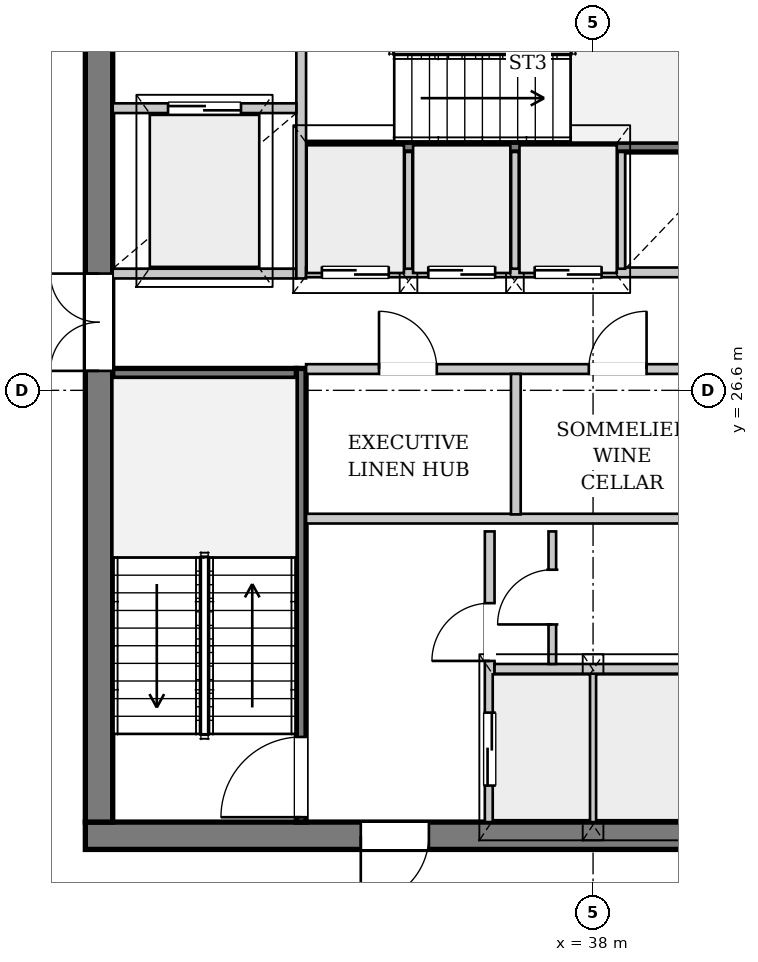
"""IFC4 building model, lengths in metres.
Left out: names, types, materials, properties, quantities, classifications, styles, units other than length and angle.
Written with IfcOpenShell. Run it as: python <this file> out.ifc"""

import sys

from ifc_helpers import new_model, si_unit, direction, frame, frame_2d, origin, place, context, subcontext, project, spatial, rectangle, extrude, source, transform, mapped, element, fill, save


model = new_model("IFC4")
c1 = context("Model", 3, precision=1e-05, world=origin(), true_north=direction((0.0, 1.0)))
c2 = subcontext(c1, "Body", "Model", "MODEL_VIEW")
j1 = project(units=[si_unit("LENGTHUNIT", "METRE"), si_unit("PLANEANGLEUNIT", "RADIAN")], contexts=[c1])
p1 = place(None, origin())
s1 = spatial("IfcSite", under=j1, at=p1, CompositionType="ELEMENT")
p2 = place(p1, origin())
s2 = spatial("IfcBuilding", under=s1, at=p2, CompositionType="ELEMENT")
p3 = place(p2, frame((0.0, 0.0, 223.8)))
s3 = spatial("IfcBuildingStorey", under=s2, at=p3, CompositionType="ELEMENT", Elevation=223.8)
p4 = place(p3, frame((15.581, 31.156, 0.0), z_axis=(0.0, 0.0, 1.0), x_axis=(0.882484000586, 0.470342416448, 0.0)))
e1 = element("IfcWall", 1, at=p4, inside=s3, PredefinedType="SOLIDWALL", context=c2, shape_type="SweptSolid", body=[
    extrude(rectangle(XDim=22.425, YDim=0.38, at=frame_2d((11.213, 0.0))), origin(), (0.0, 0.0, 1.0), 2.822),
])
p5 = place(p4, frame((5.179, 0.0, 0.452)))
e2 = element("IfcOpeningElement", 2, at=p5, cuts=e1, PredefinedType="OPENING", context=c2, shape_type="SweptSolid", body=[
    extrude(rectangle(XDim=2.2, YDim=2.25, at=frame_2d((1.1, 1.125))), frame((0.0, 0.2, 0.0), z_axis=(0.0, -1.0, 0.0), x_axis=(1.0, 0.0, 0.0)), (0.0, 0.0, 1.0), 0.4),
])
p6 = place(p4, frame((15.496, 0.0, 0.452)))
e3 = element("IfcOpeningElement", 3, at=p6, cuts=e1, PredefinedType="OPENING", context=c2, shape_type="SweptSolid", body=[
    extrude(rectangle(XDim=2.2, YDim=2.25, at=frame_2d((1.1, 1.125))), frame((0.0, 0.2, 0.0), z_axis=(0.0, -1.0, 0.0), x_axis=(1.0, 0.0, 0.0)), (0.0, 0.0, 1.0), 0.4),
])
p7 = place(p3, frame((46.35, 19.275, 0.0), z_axis=(0.0, 0.0, 1.0), x_axis=(-1.0, 0.0, 0.0)))
e4 = element("IfcWall", 4, at=p7, inside=s3, PredefinedType="SHEAR", context=c2, shape_type="SweptSolid", body=[
    extrude(rectangle(XDim=16.7, YDim=0.45, at=frame_2d((8.35, 0.0))), origin(), (0.0, 0.0, 1.0), 3.33),
])
p8 = place(p7, frame((4.55, 0.0, 0.0)))
e5 = element("IfcOpeningElement", 5, at=p8, cuts=e4, PredefinedType="OPENING", context=c2, shape_type="SweptSolid", body=[
    extrude(rectangle(XDim=1.12, YDim=2.25, at=frame_2d((0.56, 1.125))), frame((0.0, 0.235, 0.0), z_axis=(0.0, -1.0, 0.0), x_axis=(1.0, 0.0, 0.0)), (0.0, 0.0, 1.0), 0.47),
])
p9 = place(p7, frame((11.05, 0.0, 0.0)))
e6 = element("IfcOpeningElement", 6, at=p9, cuts=e4, PredefinedType="OPENING", context=c2, shape_type="SweptSolid", body=[
    extrude(rectangle(XDim=1.12, YDim=2.25, at=frame_2d((0.56, 1.125))), frame((0.0, 0.235, 0.0), z_axis=(0.0, -1.0, 0.0), x_axis=(1.0, 0.0, 0.0)), (0.0, 0.0, 1.0), 0.47),
])
p10 = place(p3, frame((29.875, 19.5, 0.0), z_axis=(0.0, 0.0, 1.0), x_axis=(0.0, 1.0, 0.0)))
e7 = element("IfcWall", 7, at=p10, inside=s3, PredefinedType="SHEAR", context=c2, shape_type="SweptSolid", body=[
    extrude(rectangle(XDim=14.2, YDim=0.45, at=frame_2d((7.1, 0.0))), origin(), (0.0, 0.0, 1.0), 3.33),
])
p11 = place(p10, frame((7.42, 0.0, 0.0)))
e8 = element("IfcOpeningElement", 8, at=p11, cuts=e7, PredefinedType="OPENING", context=c2, shape_type="SweptSolid", body=[
    extrude(rectangle(XDim=1.6, YDim=2.2, at=frame_2d((0.8, 1.1))), frame((0.0, 0.235, 0.0), z_axis=(0.0, -1.0, 0.0), x_axis=(1.0, 0.0, 0.0)), (0.0, 0.0, 1.0), 0.47),
])
p12 = place(p3, frame((33.2, 19.5, 0.0), z_axis=(0.0, 0.0, 1.0), x_axis=(0.0, 1.0, 0.0)))
e9 = element("IfcWall", 9, at=p12, inside=s3, PredefinedType="PARTITIONING", context=c2, shape_type="SweptSolid", body=[
    extrude(rectangle(XDim=7.46, YDim=0.16, at=frame_2d((3.73, 0.0))), origin(), (0.0, 0.0, 1.0), 3.33),
])
p13 = place(p12, frame((0.08, 0.0, 0.0)))
e10 = element("IfcOpeningElement", 10, at=p13, cuts=e9, PredefinedType="OPENING", context=c2, shape_type="SweptSolid", body=[
    extrude(rectangle(XDim=1.32, YDim=2.2, at=frame_2d((0.66, 1.1))), frame((0.0, 0.09, 0.0), z_axis=(0.0, -1.0, 0.0), x_axis=(1.0, 0.0, 0.0)), (0.0, 0.0, 1.0), 0.18),
])
p14 = place(p3, frame((30.1, 26.88, 0.0), z_axis=(0.0, 0.0, 1.0), x_axis=(1.0, 0.0, 0.0)))
e11 = element("IfcWall", 11, at=p14, inside=s3, PredefinedType="PARTITIONING", context=c2, shape_type="SweptSolid", body=[
    extrude(rectangle(XDim=3.02, YDim=0.16, at=frame_2d((1.51, 0.0))), origin(), (0.0, 0.0, 1.0), 3.33),
])
p15 = place(p3, frame((33.28, 30.6, 0.0), z_axis=(0.0, 0.0, 1.0), x_axis=(1.0, 0.0, 0.0)))
e12 = element("IfcWall", 12, at=p15, inside=s3, PredefinedType="PARTITIONING", context=c2, shape_type="SweptSolid", body=[
    extrude(rectangle(XDim=7.3, YDim=0.16, at=frame_2d((3.65, 0.0))), origin(), (0.0, 0.0, 1.0), 3.33),
])
p16 = place(p3, frame((36.3, 19.5, 0.0), z_axis=(0.0, 0.0, 1.0), x_axis=(0.0, 1.0, 0.0)))
e13 = element("IfcWall", 13, at=p16, inside=s3, PredefinedType="PARTITIONING", context=c2, shape_type="SweptSolid", body=[
    extrude(rectangle(XDim=4.78, YDim=0.16, at=frame_2d((2.39, 0.0))), origin(), (0.0, 0.0, 1.0), 3.33),
])
p17 = place(p16, frame((0.6, 0.0, 0.0)))
e14 = element("IfcOpeningElement", 14, at=p17, cuts=e13, PredefinedType="OPENING", context=c2, shape_type="SweptSolid", body=[
    extrude(rectangle(XDim=1.2, YDim=2.2, at=frame_2d((0.6, 1.1))), frame((0.0, 0.09, 0.0), z_axis=(0.0, -1.0, 0.0), x_axis=(1.0, 0.0, 0.0)), (0.0, 0.0, 1.0), 0.18),
])
p18 = place(p16, frame((2.65, 0.0, 0.0)))
e15 = element("IfcOpeningElement", 15, at=p18, cuts=e13, PredefinedType="OPENING", context=c2, shape_type="SweptSolid", body=[
    extrude(rectangle(XDim=0.95, YDim=2.1, at=frame_2d((0.475, 1.05))), frame((0.0, 0.09, 0.0), z_axis=(0.0, -1.0, 0.0), x_axis=(1.0, 0.0, 0.0)), (0.0, 0.0, 1.0), 0.18),
])
p19 = place(p3, frame((38.0, 19.5, 0.0), z_axis=(0.0, 0.0, 1.0), x_axis=(0.0, 1.0, 0.0)))
e16 = element("IfcWall", 16, at=p19, inside=s3, PredefinedType="PARTITIONING", context=c2, shape_type="SweptSolid", body=[
    extrude(rectangle(XDim=2.46, YDim=0.125, at=frame_2d((1.23, 0.0))), origin(), (0.0, 0.0, 1.0), 3.33),
])
p20 = place(p3, frame((36.38, 22.02, 0.0), z_axis=(0.0, 0.0, 1.0), x_axis=(1.0, 0.0, 0.0)))
e17 = element("IfcWall", 17, at=p20, inside=s3, PredefinedType="PARTITIONING", context=c2, shape_type="SweptSolid", body=[
    extrude(rectangle(XDim=3.24, YDim=0.16, at=frame_2d((1.62, 0.0))), origin(), (0.0, 0.0, 1.0), 3.33),
])
p21 = place(p3, frame((33.28, 24.49, 0.0), z_axis=(0.0, 0.0, 1.0), x_axis=(1.0, 0.0, 0.0)))
e18 = element("IfcWall", 18, at=p21, inside=s3, PredefinedType="PARTITIONING", context=c2, shape_type="SweptSolid", body=[
    extrude(rectangle(XDim=9.44, YDim=0.16, at=frame_2d((4.72, 0.0))), origin(), (0.0, 0.0, 1.0), 3.33),
])
p22 = place(p3, frame((37.33, 22.1, 0.0), z_axis=(0.0, 0.0, 1.0), x_axis=(0.0, 1.0, 0.0)))
e19 = element("IfcWall", 19, at=p22, inside=s3, PredefinedType="PARTITIONING", context=c2, shape_type="SweptSolid", body=[
    extrude(rectangle(XDim=2.18, YDim=0.125, at=frame_2d((1.09, 0.0))), origin(), (0.0, 0.0, 1.0), 3.33),
])
p23 = place(p22, frame((0.65, 0.0, 0.0)))
e20 = element("IfcOpeningElement", 20, at=p23, cuts=e19, PredefinedType="OPENING", context=c2, shape_type="SweptSolid", body=[
    extrude(rectangle(XDim=0.9, YDim=2.1, at=frame_2d((0.45, 1.05))), frame((0.0, 0.073, 0.0), z_axis=(0.0, -1.0, 0.0), x_axis=(1.0, 0.0, 0.0)), (0.0, 0.0, 1.0), 0.145),
])
p24 = place(p3, frame((30.1, 28.52, 0.0), z_axis=(0.0, 0.0, 1.0), x_axis=(1.0, 0.0, 0.0)))
e21 = element("IfcWall", 21, at=p24, inside=s3, PredefinedType="PARTITIONING", context=c2, shape_type="SweptSolid", body=[
    extrude(rectangle(XDim=3.02, YDim=0.16, at=frame_2d((1.51, 0.0))), origin(), (0.0, 0.0, 1.0), 3.33),
])
p25 = place(p3, frame((33.2, 28.44, 0.0), z_axis=(0.0, 0.0, 1.0), x_axis=(0.0, 1.0, 0.0)))
e22 = element("IfcWall", 22, at=p25, inside=s3, PredefinedType="PARTITIONING", context=c2, shape_type="SweptSolid", body=[
    extrude(rectangle(XDim=5.26, YDim=0.16, at=frame_2d((2.63, 0.0))), origin(), (0.0, 0.0, 1.0), 3.33),
])
p26 = place(p3, frame((30.1, 31.24, 0.0), z_axis=(0.0, 0.0, 1.0), x_axis=(1.0, 0.0, 0.0)))
e23 = element("IfcWall", 23, at=p26, inside=s3, PredefinedType="PARTITIONING", context=c2, shape_type="SweptSolid", body=[
    extrude(rectangle(XDim=3.02, YDim=0.16, at=frame_2d((1.51, 0.0))), origin(), (0.0, 0.0, 1.0), 3.33),
])
p27 = place(p26, frame((0.91, 0.0, 0.0)))
e24 = element("IfcOpeningElement", 24, at=p27, cuts=e23, PredefinedType="OPENING", context=c2, shape_type="SweptSolid", body=[
    extrude(rectangle(XDim=1.2, YDim=2.2, at=frame_2d((0.6, 1.1))), frame((0.0, 0.09, 0.0), z_axis=(0.0, -1.0, 0.0), x_axis=(1.0, 0.0, 0.0)), (0.0, 0.0, 1.0), 0.18),
])
p28 = place(p3, frame((33.28, 26.95, 0.0), z_axis=(0.0, 0.0, 1.0), x_axis=(1.0, 0.0, 0.0)))
e25 = element("IfcWall", 25, at=p28, inside=s3, PredefinedType="PARTITIONING", context=c2, shape_type="SweptSolid", body=[
    extrude(rectangle(XDim=9.44, YDim=0.16, at=frame_2d((4.72, 0.0))), origin(), (0.0, 0.0, 1.0), 3.33),
])
p29 = place(p28, frame((1.2, 0.0, 0.0)))
e26 = element("IfcOpeningElement", 26, at=p29, cuts=e25, PredefinedType="OPENING", context=c2, shape_type="SweptSolid", body=[
    extrude(rectangle(XDim=0.95, YDim=2.1, at=frame_2d((0.475, 1.05))), frame((0.0, 0.09, 0.0), z_axis=(0.0, -1.0, 0.0), x_axis=(1.0, 0.0, 0.0)), (0.0, 0.0, 1.0), 0.18),
])
p30 = place(p28, frame((4.65, 0.0, 0.0)))
e27 = element("IfcOpeningElement", 27, at=p30, cuts=e25, PredefinedType="OPENING", context=c2, shape_type="SweptSolid", body=[
    extrude(rectangle(XDim=0.95, YDim=2.1, at=frame_2d((0.475, 1.05))), frame((0.0, 0.09, 0.0), z_axis=(0.0, -1.0, 0.0), x_axis=(1.0, 0.0, 0.0)), (0.0, 0.0, 1.0), 0.18),
])
p31 = place(p28, frame((7.67, 0.0, 0.0)))
e28 = element("IfcOpeningElement", 28, at=p31, cuts=e25, PredefinedType="OPENING", context=c2, shape_type="SweptSolid", body=[
    extrude(rectangle(XDim=1.1, YDim=2.2, at=frame_2d((0.55, 1.1))), frame((0.0, 0.09, 0.0), z_axis=(0.0, -1.0, 0.0), x_axis=(1.0, 0.0, 0.0)), (0.0, 0.0, 1.0), 0.18),
])
p32 = place(p3, frame((36.73, 24.56, 0.0), z_axis=(0.0, 0.0, 1.0), x_axis=(0.0, 1.0, 0.0)))
e29 = element("IfcWall", 29, at=p32, inside=s3, PredefinedType="PARTITIONING", context=c2, shape_type="SweptSolid", body=[
    extrude(rectangle(XDim=2.31, YDim=0.16, at=frame_2d((1.155, 0.0))), origin(), (0.0, 0.0, 1.0), 3.33),
])
p33 = place(p3, frame((33.28, 28.54, 0.0), z_axis=(0.0, 0.0, 1.0), x_axis=(1.0, 0.0, 0.0)))
e30 = element("IfcWall", 30, at=p33, inside=s3, PredefinedType="PARTITIONING", context=c2, shape_type="SweptSolid", body=[
    extrude(rectangle(XDim=12.62, YDim=0.16, at=frame_2d((6.31, 0.0))), origin(), (0.0, 0.0, 1.0), 3.33),
])
p34 = place(p33, frame((0.26, 0.0, 0.0)))
e31 = element("IfcOpeningElement", 31, at=p34, cuts=e30, PredefinedType="OPENING", context=c2, shape_type="SweptSolid", body=[
    extrude(rectangle(XDim=1.1, YDim=2.2, at=frame_2d((0.55, 1.1))), frame((0.0, 0.09, 0.0), z_axis=(0.0, -1.0, 0.0), x_axis=(1.0, 0.0, 0.0)), (0.0, 0.0, 1.0), 0.18),
])
p35 = place(p33, frame((2.01, 0.0, 0.0)))
e32 = element("IfcOpeningElement", 32, at=p35, cuts=e30, PredefinedType="OPENING", context=c2, shape_type="SweptSolid", body=[
    extrude(rectangle(XDim=1.1, YDim=2.2, at=frame_2d((0.55, 1.1))), frame((0.0, 0.09, 0.0), z_axis=(0.0, -1.0, 0.0), x_axis=(1.0, 0.0, 0.0)), (0.0, 0.0, 1.0), 0.18),
])
p36 = place(p33, frame((3.76, 0.0, 0.0)))
e33 = element("IfcOpeningElement", 33, at=p36, cuts=e30, PredefinedType="OPENING", context=c2, shape_type="SweptSolid", body=[
    extrude(rectangle(XDim=1.1, YDim=2.2, at=frame_2d((0.55, 1.1))), frame((0.0, 0.09, 0.0), z_axis=(0.0, -1.0, 0.0), x_axis=(1.0, 0.0, 0.0)), (0.0, 0.0, 1.0), 0.18),
])
for number, where, z_axis, x_axis in (
    (34, (34.965, 28.6, 0.0), (0.0, 0.0, 1.0), (0.0, 1.0, 0.0)),
    (35, (36.715, 28.6, 0.0), (0.0, 0.0, 1.0), (0.0, 1.0, 0.0)),
    (36, (38.465, 28.6, 0.0), (0.0, 0.0, 1.0), (0.0, 1.0, 0.0)),
):
    element("IfcWall", number, at=place(p3, frame(where, z_axis=z_axis, x_axis=x_axis)), inside=s3, PredefinedType="PARTITIONING", context=c2, shape_type="SweptSolid", body=[
        extrude(rectangle(XDim=1.92, YDim=0.125, at=frame_2d((0.96, 0.0))), origin(), (0.0, 0.0, 1.0), 3.33),
    ])
m1 = source(origin(), c2, "Body", "SweptSolid", [
    extrude(rectangle(XDim=1.12, YDim=2.25, at=frame_2d((0.56, 1.125))), frame((0.0, 0.025, 0.0), z_axis=(0.0, -1.0, 0.0), x_axis=(1.0, 0.0, 0.0)), (0.0, 0.0, 1.0), 0.05),
])
p37 = place(p9, origin())
e37 = element("IfcDoor", 37, at=p37, inside=s3, OperationType="SINGLE_SWING_RIGHT", PredefinedType="DOOR", context=c2, shape_type="MappedRepresentation", body=[
    mapped(m1, transform((0.0, 0.0, 0.0), x_axis=(1.0, 0.0, 0.0), y_axis=(0.0, 1.0, 0.0), z_axis=(0.0, 0.0, 1.0), scale=1.0)),
])
fill(e6, e37)
m2 = source(origin(), c2, "Body", "SweptSolid", [
    extrude(rectangle(XDim=1.6, YDim=2.2, at=frame_2d((0.8, 1.1))), frame((0.0, 0.025, 0.0), z_axis=(0.0, -1.0, 0.0), x_axis=(1.0, 0.0, 0.0)), (0.0, 0.0, 1.0), 0.05),
])
p38 = place(p11, origin())
e38 = element("IfcDoor", 38, at=p38, inside=s3, OperationType="DOUBLE_DOOR_SINGLE_SWING", PredefinedType="DOOR", context=c2, shape_type="MappedRepresentation", body=[
    mapped(m2, transform((0.0, 0.0, 0.0), x_axis=(1.0, 0.0, 0.0), y_axis=(0.0, 1.0, 0.0), z_axis=(0.0, 0.0, 1.0), scale=1.0)),
])
fill(e8, e38)
m3 = source(origin(), c2, "Body", "SweptSolid", [
    extrude(rectangle(XDim=1.32, YDim=2.2, at=frame_2d((0.66, 1.1))), frame((0.0, 0.025, 0.0), z_axis=(0.0, -1.0, 0.0), x_axis=(1.0, 0.0, 0.0)), (0.0, 0.0, 1.0), 0.05),
])
p39 = place(p13, origin())
e39 = element("IfcDoor", 39, at=p39, inside=s3, OperationType="SINGLE_SWING_LEFT", PredefinedType="DOOR", context=c2, shape_type="MappedRepresentation", body=[
    mapped(m3, transform((0.0, 0.0, 0.0), x_axis=(1.0, 0.0, 0.0), y_axis=(0.0, 1.0, 0.0), z_axis=(0.0, 0.0, 1.0), scale=1.0)),
])
fill(e10, e39)
m4 = source(origin(), c2, "Body", "SweptSolid", [
    extrude(rectangle(XDim=1.2, YDim=2.2, at=frame_2d((0.6, 1.1))), frame((0.0, 0.025, 0.0), z_axis=(0.0, -1.0, 0.0), x_axis=(1.0, 0.0, 0.0)), (0.0, 0.0, 1.0), 0.05),
])
p40 = place(p17, origin())
e40 = element("IfcDoor", 40, at=p40, inside=s3, OperationType="DOUBLE_DOOR_SLIDING", PredefinedType="DOOR", context=c2, shape_type="MappedRepresentation", body=[
    mapped(m4, transform((0.0, 0.0, 0.0), x_axis=(1.0, 0.0, 0.0), y_axis=(0.0, 1.0, 0.0), z_axis=(0.0, 0.0, 1.0), scale=1.0)),
])
fill(e14, e40)
m5 = source(origin(), c2, "Body", "SweptSolid", [
    extrude(rectangle(XDim=0.95, YDim=2.1, at=frame_2d((0.475, 1.05))), frame((0.0, 0.025, 0.0), z_axis=(0.0, -1.0, 0.0), x_axis=(1.0, 0.0, 0.0)), (0.0, 0.0, 1.0), 0.05),
])
p41 = place(p18, origin())
e41 = element("IfcDoor", 41, at=p41, inside=s3, OperationType="SINGLE_SWING_LEFT", PredefinedType="DOOR", context=c2, shape_type="MappedRepresentation", body=[
    mapped(m5, transform((0.0, 0.0, 0.0), x_axis=(1.0, 0.0, 0.0), y_axis=(0.0, 1.0, 0.0), z_axis=(0.0, 0.0, 1.0), scale=1.0)),
])
fill(e15, e41)
m6 = source(origin(), c2, "Body", "SweptSolid", [
    extrude(rectangle(XDim=0.9, YDim=2.1, at=frame_2d((0.45, 1.05))), frame((0.0, 0.025, 0.0), z_axis=(0.0, -1.0, 0.0), x_axis=(1.0, 0.0, 0.0)), (0.0, 0.0, 1.0), 0.05),
])
p42 = place(p23, origin())
e42 = element("IfcDoor", 42, at=p42, inside=s3, OperationType="SINGLE_SWING_LEFT", PredefinedType="DOOR", context=c2, shape_type="MappedRepresentation", body=[
    mapped(m6, transform((0.0, 0.0, 0.0), x_axis=(1.0, 0.0, 0.0), y_axis=(0.0, 1.0, 0.0), z_axis=(0.0, 0.0, 1.0), scale=1.0)),
])
fill(e20, e42)
p43 = place(p27, origin())
e43 = element("IfcDoor", 43, at=p43, inside=s3, OperationType="DOUBLE_DOOR_SLIDING", PredefinedType="DOOR", context=c2, shape_type="MappedRepresentation", body=[
    mapped(m4, transform((0.0, 0.0, 0.0), x_axis=(1.0, 0.0, 0.0), y_axis=(0.0, 1.0, 0.0), z_axis=(0.0, 0.0, 1.0), scale=1.0)),
])
fill(e24, e43)
p44 = place(p29, origin())
e44 = element("IfcDoor", 44, at=p44, inside=s3, OperationType="SINGLE_SWING_LEFT", PredefinedType="DOOR", context=c2, shape_type="MappedRepresentation", body=[
    mapped(m5, transform((0.0, 0.0, 0.0), x_axis=(1.0, 0.0, 0.0), y_axis=(0.0, 1.0, 0.0), z_axis=(0.0, 0.0, 1.0), scale=1.0)),
])
fill(e26, e44)
p45 = place(p30, origin())
e45 = element("IfcDoor", 45, at=p45, inside=s3, OperationType="SINGLE_SWING_RIGHT", PredefinedType="DOOR", context=c2, shape_type="MappedRepresentation", body=[
    mapped(m5, transform((0.0, 0.0, 0.0), x_axis=(1.0, 0.0, 0.0), y_axis=(0.0, 1.0, 0.0), z_axis=(0.0, 0.0, 1.0), scale=1.0)),
])
fill(e27, e45)
m7 = source(origin(), c2, "Body", "SweptSolid", [
    extrude(rectangle(XDim=1.1, YDim=2.2, at=frame_2d((0.55, 1.1))), frame((0.0, 0.025, 0.0), z_axis=(0.0, -1.0, 0.0), x_axis=(1.0, 0.0, 0.0)), (0.0, 0.0, 1.0), 0.05),
])
p46 = place(p34, origin())
e46 = element("IfcDoor", 46, at=p46, inside=s3, OperationType="DOUBLE_DOOR_SLIDING", PredefinedType="DOOR", context=c2, shape_type="MappedRepresentation", body=[
    mapped(m7, transform((0.0, 0.0, 0.0), x_axis=(1.0, 0.0, 0.0), y_axis=(0.0, 1.0, 0.0), z_axis=(0.0, 0.0, 1.0), scale=1.0)),
])
fill(e31, e46)
p47 = place(p35, origin())
e47 = element("IfcDoor", 47, at=p47, inside=s3, OperationType="DOUBLE_DOOR_SLIDING", PredefinedType="DOOR", context=c2, shape_type="MappedRepresentation", body=[
    mapped(m7, transform((0.0, 0.0, 0.0), x_axis=(1.0, 0.0, 0.0), y_axis=(0.0, 1.0, 0.0), z_axis=(0.0, 0.0, 1.0), scale=1.0)),
])
fill(e32, e47)
p48 = place(p36, origin())
e48 = element("IfcDoor", 48, at=p48, inside=s3, OperationType="DOUBLE_DOOR_SLIDING", PredefinedType="DOOR", context=c2, shape_type="MappedRepresentation", body=[
    mapped(m7, transform((0.0, 0.0, 0.0), x_axis=(1.0, 0.0, 0.0), y_axis=(0.0, 1.0, 0.0), z_axis=(0.0, 0.0, 1.0), scale=1.0)),
])
fill(e33, e48)
save(model, sys.argv[1])
